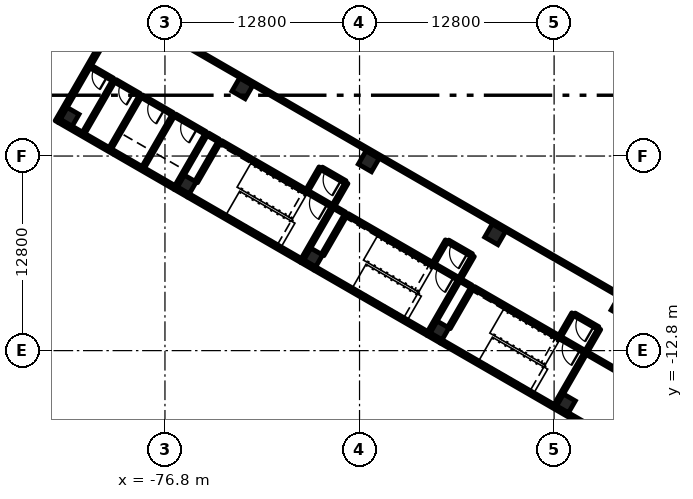
"""IFC4 building model, lengths in metres.
Left out: names, types, materials, properties, quantities, classifications, styles, units other than length and angle.
Written with IfcOpenShell. Run it as: python <this file> out.ifc"""

import sys

from ifc_helpers import new_model, si_unit, direction, frame, frame_2d, origin, origin_2d, place, context, subcontext, project, spatial, rectangle, extrude, element, fill, save


model = new_model("IFC4")
c1 = context("Model", 3, precision=1e-05, world=origin(), true_north=direction((0.0, 1.0)))
c2 = subcontext(c1, "Body", "Model", "MODEL_VIEW")
j1 = project(units=[si_unit("LENGTHUNIT", "METRE"), si_unit("PLANEANGLEUNIT", "RADIAN")], contexts=[c1])
p1 = place(None, origin())
s1 = spatial("IfcSite", under=j1, at=p1, CompositionType="ELEMENT")
p2 = place(p1, origin())
s2 = spatial("IfcBuilding", under=s1, at=p2, CompositionType="ELEMENT")
p3 = place(p2, frame((0.0, 0.0, 11.4)))
s3 = spatial("IfcBuildingStorey", under=s2, at=p3, CompositionType="ELEMENT", Elevation=11.4)
for number, where, z_axis, x_axis in (
    (1, (-46.768, -9.949, 0.0), (0.0, 0.0, 1.0), (-0.5, -0.866, 0.0)),
    (2, (-55.082, -5.149, 0.0), (0.0, 0.0, 1.0), (-0.5, -0.866, 0.0)),
    (3, (-63.396, -0.349, 0.0), (0.0, 0.0, 1.0), (-0.5, -0.866, 0.0)),
    (4, (-71.71, 4.451, 0.0), (0.0, 0.0, 1.0), (-0.5, -0.866, 0.0)),
):
    element("IfcColumn", number, at=place(p3, frame(where, z_axis=z_axis, x_axis=x_axis)), inside=s3, PredefinedType="COLUMN", context=c2, shape_type="SweptSolid", body=[
        extrude(rectangle(XDim=1.0, YDim=1.0, at=origin_2d()), origin(), (0.0, 0.0, 1.0), 4.8),
    ])
for number, where, z_axis, x_axis in (
    (5, (-50.418, -16.271, 0.0), (0.0, 0.0, 1.0), (-0.5, -0.866, 0.0)),
    (6, (-58.732, -11.471, 0.0), (0.0, 0.0, 1.0), (-0.5, -0.866, 0.0)),
    (7, (-67.046, -6.671, 0.0), (0.0, 0.0, 1.0), (-0.5, -0.866, 0.0)),
    (8, (-75.36, -1.871, 0.0), (0.0, 0.0, 1.0), (-0.5, -0.866, 0.0)),
    (9, (-83.067, 2.579, 0.0), (0.0, 0.0, 1.0), (-0.5, -0.866, 0.0)),
):
    element("IfcColumn", number, at=place(p3, frame(where, z_axis=z_axis, x_axis=x_axis)), inside=s3, PredefinedType="COLUMN", context=c2, shape_type="SweptSolid", body=[
        extrude(rectangle(XDim=0.9, YDim=0.9, at=origin_2d()), origin(), (0.0, 0.0, 1.0), 4.8),
    ])
p4 = place(p3, frame((-83.915, 2.26, 0.0), z_axis=(0.0, 0.0, 1.0), x_axis=(0.500001855621, 0.866024332438, 0.0)))
e10 = element("IfcWall", 10, at=p4, inside=s3, PredefinedType="SOLIDWALL", context=c2, shape_type="SweptSolid", body=[
    extrude(rectangle(XDim=10.312, YDim=0.25, at=frame_2d((5.156, 0.0))), origin(), (0.0, 0.0, 1.0), 4.5),
])
p5 = place(p3, frame((-48.562, -18.006, 0.0), z_axis=(0.0, 0.0, 1.0), x_axis=(-0.866027159341, 0.499996959274, 0.0)))
e11 = element("IfcWall", 11, at=p5, inside=s3, PredefinedType="SOLIDWALL", context=c2, shape_type="SweptSolid", body=[
    extrude(rectangle(XDim=11.625, YDim=0.25, at=frame_2d((5.812, 0.0))), origin(), (0.0, 0.0, 1.0), 4.5),
])
p6 = place(p3, frame((-59.496, -11.694, 0.0), z_axis=(0.0, 0.0, 1.0), x_axis=(-0.866021068297, 0.500007509209, 0.0)))
e12 = element("IfcWall", 12, at=p6, inside=s3, PredefinedType="SOLIDWALL", context=c2, shape_type="SweptSolid", body=[
    extrude(rectangle(XDim=8.6, YDim=0.25, at=frame_2d((4.3, 0.0))), origin(), (0.0, 0.0, 1.0), 4.5),
])
p7 = place(p3, frame((-67.81, -6.894, 0.0), z_axis=(0.0, 0.0, 1.0), x_axis=(-0.866028165386, 0.499995216735, 0.0)))
e13 = element("IfcWall", 13, at=p7, inside=s3, PredefinedType="SOLIDWALL", context=c2, shape_type="SweptSolid", body=[
    extrude(rectangle(XDim=8.6, YDim=0.25, at=frame_2d((4.3, 0.0))), origin(), (0.0, 0.0, 1.0), 4.5),
])
p8 = place(p3, frame((-76.124, -2.094, 0.0), z_axis=(0.0, 0.0, 1.0), x_axis=(-0.866025267465, 0.500000236112, 0.0)))
e14 = element("IfcWall", 14, at=p8, inside=s3, PredefinedType="SOLIDWALL", context=c2, shape_type="SweptSolid", body=[
    extrude(rectangle(XDim=8.8, YDim=0.25, at=frame_2d((4.4, 0.0))), origin(), (0.0, 0.0, 1.0), 4.5),
])
for number, where, z_axis, x_axis in (
    (15, (-58.63, -12.194, 0.0), (0.0, 0.0, 1.0), (-0.866, 0.5, 0.0)),
    (16, (-66.944, -7.394, 0.0), (0.0, 0.0, 1.0), (-0.866, 0.5, 0.0)),
    (17, (-75.258, -2.594, 0.0), (0.0, 0.0, 1.0), (-0.866, 0.5, 0.0)),
):
    element("IfcWall", number, at=place(p3, frame(where, z_axis=z_axis, x_axis=x_axis)), inside=s3, PredefinedType="SOLIDWALL", context=c2, shape_type="SweptSolid", body=[
        extrude(rectangle(XDim=1.0, YDim=0.25, at=frame_2d((0.5, 0.0))), origin(), (0.0, 0.0, 1.0), 4.5),
    ])
p9 = place(p3, frame((-49.119, -12.921, 0.0), z_axis=(0.0, 0.0, 1.0), x_axis=(-0.49999894854, -0.866026010844, 0.0)))
e18 = element("IfcWall", 18, at=p9, inside=s3, PredefinedType="SOLIDWALL", context=c2, shape_type="SweptSolid", body=[
    extrude(rectangle(XDim=4.0, YDim=0.2, at=frame_2d((2.0, 0.0))), origin(), (0.0, 0.0, 1.0), 4.5),
])
p10 = place(p3, frame((-56.567, -8.621, 0.0), z_axis=(0.0, 0.0, 1.0), x_axis=(-0.499933790963, -0.866063626216, 0.0)))
e19 = element("IfcWall", 19, at=p10, inside=s3, PredefinedType="SOLIDWALL", context=c2, shape_type="SweptSolid", body=[
    extrude(rectangle(XDim=3.1, YDim=0.2, at=frame_2d((1.55, 0.0))), origin(), (0.0, 0.0, 1.0), 4.5),
])
p11 = place(p3, frame((-57.433, -8.121, 0.0), z_axis=(0.0, 0.0, 1.0), x_axis=(-0.49999894854, -0.866026010844, 0.0)))
e20 = element("IfcWall", 20, at=p11, inside=s3, PredefinedType="SOLIDWALL", context=c2, shape_type="SweptSolid", body=[
    extrude(rectangle(XDim=4.0, YDim=0.2, at=frame_2d((2.0, 0.0))), origin(), (0.0, 0.0, 1.0), 4.5),
])
p12 = place(p3, frame((-64.881, -3.821, 0.0), z_axis=(0.0, 0.0, 1.0), x_axis=(-0.49999285859, -0.86602952684, 0.0)))
e21 = element("IfcWall", 21, at=p12, inside=s3, PredefinedType="SOLIDWALL", context=c2, shape_type="SweptSolid", body=[
    extrude(rectangle(XDim=3.1, YDim=0.2, at=frame_2d((1.55, 0.0))), origin(), (0.0, 0.0, 1.0), 4.5),
])
p13 = place(p3, frame((-65.747, -3.321, 0.0), z_axis=(0.0, 0.0, 1.0), x_axis=(-0.49999894854, -0.866026010844, 0.0)))
e22 = element("IfcWall", 22, at=p13, inside=s3, PredefinedType="SOLIDWALL", context=c2, shape_type="SweptSolid", body=[
    extrude(rectangle(XDim=4.0, YDim=0.2, at=frame_2d((2.0, 0.0))), origin(), (0.0, 0.0, 1.0), 4.5),
])
p14 = place(p3, frame((-73.195, 0.979, 0.0), z_axis=(0.0, 0.0, 1.0), x_axis=(-0.500026960575, -0.86600983753, 0.0)))
e23 = element("IfcWall", 23, at=p14, inside=s3, PredefinedType="SOLIDWALL", context=c2, shape_type="SweptSolid", body=[
    extrude(rectangle(XDim=3.1, YDim=0.2, at=frame_2d((1.55, 0.0))), origin(), (0.0, 0.0, 1.0), 4.5),
])
p15 = place(p3, frame((-49.206, -12.871, 0.0), z_axis=(0.0, 0.0, 1.0), x_axis=(-0.866036909293, 0.499980071345, 0.0)))
e24 = element("IfcWall", 24, at=p15, inside=s3, PredefinedType="SOLIDWALL", context=c2, shape_type="SweptSolid", body=[
    extrude(rectangle(XDim=1.75, YDim=0.2, at=frame_2d((0.875, 0.0))), origin(), (0.0, 0.0, 1.0), 4.5),
])
p16 = place(p15, frame((0.3, 0.0, 0.0)))
e25 = element("IfcOpeningElement", 25, at=p16, cuts=e24, PredefinedType="OPENING", context=c2, shape_type="SweptSolid", body=[
    extrude(rectangle(XDim=1.2, YDim=2.1, at=frame_2d((0.6, 1.05))), frame((0.0, 0.11, 0.0), z_axis=(0.0, -1.0, 0.0), x_axis=(1.0, 0.0, 0.0)), (0.0, 0.0, 1.0), 0.22),
])
p17 = place(p3, frame((-50.722, -11.996, 0.0), z_axis=(0.0, 0.0, 1.0), x_axis=(-0.866027239912, 0.49999681972, 0.0)))
e26 = element("IfcWall", 26, at=p17, inside=s3, PredefinedType="SOLIDWALL", context=c2, shape_type="SweptSolid", body=[
    extrude(rectangle(XDim=6.65, YDim=0.2, at=frame_2d((3.325, 0.0))), origin(), (0.0, 0.0, 1.0), 4.5),
])
p18 = place(p3, frame((-57.52, -8.071, 0.0), z_axis=(0.0, 0.0, 1.0), x_axis=(-0.866002029911, 0.500040482552, 0.0)))
e27 = element("IfcWall", 27, at=p18, inside=s3, PredefinedType="SOLIDWALL", context=c2, shape_type="SweptSolid", body=[
    extrude(rectangle(XDim=1.75, YDim=0.2, at=frame_2d((0.875, 0.0))), origin(), (0.0, 0.0, 1.0), 4.5),
])
p19 = place(p18, frame((0.3, 0.0, 0.0)))
e28 = element("IfcOpeningElement", 28, at=p19, cuts=e27, PredefinedType="OPENING", context=c2, shape_type="SweptSolid", body=[
    extrude(rectangle(XDim=1.2, YDim=2.1, at=frame_2d((0.6, 1.05))), frame((0.0, 0.11, 0.0), z_axis=(0.0, -1.0, 0.0), x_axis=(1.0, 0.0, 0.0)), (0.0, 0.0, 1.0), 0.22),
])
p20 = place(p3, frame((-59.035, -7.196, 0.0), z_axis=(0.0, 0.0, 1.0), x_axis=(-0.866027239912, 0.49999681972, 0.0)))
e29 = element("IfcWall", 29, at=p20, inside=s3, PredefinedType="SOLIDWALL", context=c2, shape_type="SweptSolid", body=[
    extrude(rectangle(XDim=6.65, YDim=0.2, at=frame_2d((3.325, 0.0))), origin(), (0.0, 0.0, 1.0), 4.5),
])
p21 = place(p3, frame((-65.834, -3.271, 0.0), z_axis=(0.0, 0.0, 1.0), x_axis=(-0.866036909293, 0.499980071345, 0.0)))
e30 = element("IfcWall", 30, at=p21, inside=s3, PredefinedType="SOLIDWALL", context=c2, shape_type="SweptSolid", body=[
    extrude(rectangle(XDim=1.75, YDim=0.2, at=frame_2d((0.875, 0.0))), origin(), (0.0, 0.0, 1.0), 4.5),
])
p22 = place(p21, frame((0.3, 0.0, 0.0)))
e31 = element("IfcOpeningElement", 31, at=p22, cuts=e30, PredefinedType="OPENING", context=c2, shape_type="SweptSolid", body=[
    extrude(rectangle(XDim=1.2, YDim=2.1, at=frame_2d((0.6, 1.05))), frame((0.0, 0.11, 0.0), z_axis=(0.0, -1.0, 0.0), x_axis=(1.0, 0.0, 0.0)), (0.0, 0.0, 1.0), 0.22),
])
p23 = place(p3, frame((-67.349, -2.396, 0.0), z_axis=(0.0, 0.0, 1.0), x_axis=(-0.86601134256, 0.500024353964, 0.0)))
e32 = element("IfcWall", 32, at=p23, inside=s3, PredefinedType="SOLIDWALL", context=c2, shape_type="SweptSolid", body=[
    extrude(rectangle(XDim=6.65, YDim=0.2, at=frame_2d((3.325, 0.0))), origin(), (0.0, 0.0, 1.0), 4.5),
])
for number, where, z_axis, x_axis in (
    (33, (-74.061, 1.479, 0.0), (0.0, 0.0, 1.0), (-0.5, -0.866, 0.0)),
    (34, (-76.226, 2.729, 0.0), (0.0, 0.0, 1.0), (-0.5, -0.866, 0.0)),
    (35, (-78.391, 3.979, 0.0), (0.0, 0.0, 1.0), (-0.5, -0.866, 0.0)),
):
    element("IfcWall", number, at=place(p3, frame(where, z_axis=z_axis, x_axis=x_axis)), inside=s3, PredefinedType="SOLIDWALL", context=c2, shape_type="SweptSolid", body=[
        extrude(rectangle(XDim=4.0, YDim=0.2, at=frame_2d((2.0, 0.0))), origin(), (0.0, 0.0, 1.0), 4.5),
    ])
p24 = place(p3, frame((-74.148, 1.529, 0.0), z_axis=(0.0, 0.0, 1.0), x_axis=(-0.865980515519, 0.500077740698, 0.0)))
e36 = element("IfcWall", 36, at=p24, inside=s3, PredefinedType="SOLIDWALL", context=c2, shape_type="SweptSolid", body=[
    extrude(rectangle(XDim=2.3, YDim=0.2, at=frame_2d((1.15, 0.0))), origin(), (0.0, 0.0, 1.0), 4.5),
])
p25 = place(p24, frame((0.6, 0.0, 0.0)))
e37 = element("IfcOpeningElement", 37, at=p25, cuts=e36, PredefinedType="OPENING", context=c2, shape_type="SweptSolid", body=[
    extrude(rectangle(XDim=1.1, YDim=2.1, at=frame_2d((0.55, 1.05))), frame((0.0, 0.11, 0.0), z_axis=(0.0, -1.0, 0.0), x_axis=(1.0, 0.0, 0.0)), (0.0, 0.0, 1.0), 0.22),
])
p26 = place(p3, frame((-76.313, 2.779, 0.0), z_axis=(0.0, 0.0, 1.0), x_axis=(-0.865980515519, 0.500077740698, 0.0)))
e38 = element("IfcWall", 38, at=p26, inside=s3, PredefinedType="SOLIDWALL", context=c2, shape_type="SweptSolid", body=[
    extrude(rectangle(XDim=2.3, YDim=0.2, at=frame_2d((1.15, 0.0))), origin(), (0.0, 0.0, 1.0), 4.5),
])
p27 = place(p26, frame((0.6, 0.0, 0.0)))
e39 = element("IfcOpeningElement", 39, at=p27, cuts=e38, PredefinedType="OPENING", context=c2, shape_type="SweptSolid", body=[
    extrude(rectangle(XDim=1.1, YDim=2.1, at=frame_2d((0.55, 1.05))), frame((0.0, 0.11, 0.0), z_axis=(0.0, -1.0, 0.0), x_axis=(1.0, 0.0, 0.0)), (0.0, 0.0, 1.0), 0.22),
])
for number, where, z_axis, x_axis in (
    (40, (-48.219, -11.363, 0.0), (0.0, 0.0, 1.0), (-0.5, -0.866, 0.0)),
    (41, (-49.951, -10.363, 0.0), (0.0, 0.0, 1.0), (-0.5, -0.866, 0.0)),
):
    element("IfcWall", number, at=place(p3, frame(where, z_axis=z_axis, x_axis=x_axis)), inside=s3, PredefinedType="PARTITIONING", context=c2, shape_type="SweptSolid", body=[
        extrude(rectangle(XDim=1.7, YDim=0.2, at=frame_2d((0.85, 0.0))), origin(), (0.0, 0.0, 1.0), 3.9),
    ])
for number, where, z_axis, x_axis in (
    (42, (-56.533, -6.562, 0.0), (0.0, 0.0, 1.0), (-0.5, -0.866, 0.0)),
    (43, (-58.265, -5.562, 0.0), (0.0, 0.0, 1.0), (-0.5, -0.866, 0.0)),
):
    element("IfcWall", number, at=place(p3, frame(where, z_axis=z_axis, x_axis=x_axis)), inside=s3, PredefinedType="PARTITIONING", context=c2, shape_type="SweptSolid", body=[
        extrude(rectangle(XDim=1.7, YDim=0.2, at=frame_2d((0.85, 0.0))), origin(), (0.0, 0.0, 1.0), 3.9),
    ])
for number, where, z_axis, x_axis in (
    (44, (-64.847, -1.763, 0.0), (0.0, 0.0, 1.0), (-0.5, -0.866, 0.0)),
    (45, (-66.579, -0.763, 0.0), (0.0, 0.0, 1.0), (-0.5, -0.866, 0.0)),
):
    element("IfcWall", number, at=place(p3, frame(where, z_axis=z_axis, x_axis=x_axis)), inside=s3, PredefinedType="PARTITIONING", context=c2, shape_type="SweptSolid", body=[
        extrude(rectangle(XDim=1.7, YDim=0.2, at=frame_2d((0.85, 0.0))), origin(), (0.0, 0.0, 1.0), 3.9),
    ])
p28 = place(p3, frame((-48.306, -11.312, 0.0), z_axis=(0.0, 0.0, 1.0), x_axis=(-0.866047807691, 0.499961193289, 0.0)))
e46 = element("IfcWall", 46, at=p28, inside=s3, PredefinedType="PARTITIONING", context=c2, shape_type="SweptSolid", body=[
    extrude(rectangle(XDim=1.8, YDim=0.2, at=frame_2d((0.9, 0.0))), origin(), (0.0, 0.0, 1.0), 3.9),
])
p29 = place(p28, frame((0.3, 0.0, 0.0)))
e47 = element("IfcOpeningElement", 47, at=p29, cuts=e46, PredefinedType="OPENING", context=c2, shape_type="SweptSolid", body=[
    extrude(rectangle(XDim=1.2, YDim=2.1, at=frame_2d((0.6, 1.05))), frame((0.0, 0.11, 0.0), z_axis=(0.0, -1.0, 0.0), x_axis=(1.0, 0.0, 0.0)), (0.0, 0.0, 1.0), 0.22),
])
p30 = place(p3, frame((-56.62, -6.513, 0.0), z_axis=(0.0, 0.0, 1.0), x_axis=(-0.865989075817, 0.500062916607, 0.0)))
e48 = element("IfcWall", 48, at=p30, inside=s3, PredefinedType="PARTITIONING", context=c2, shape_type="SweptSolid", body=[
    extrude(rectangle(XDim=1.8, YDim=0.2, at=frame_2d((0.9, 0.0))), origin(), (0.0, 0.0, 1.0), 3.9),
])
p31 = place(p30, frame((0.3, 0.0, 0.0)))
e49 = element("IfcOpeningElement", 49, at=p31, cuts=e48, PredefinedType="OPENING", context=c2, shape_type="SweptSolid", body=[
    extrude(rectangle(XDim=1.2, YDim=2.1, at=frame_2d((0.6, 1.05))), frame((0.0, 0.11, 0.0), z_axis=(0.0, -1.0, 0.0), x_axis=(1.0, 0.0, 0.0)), (0.0, 0.0, 1.0), 0.22),
])
p32 = place(p3, frame((-64.934, -1.713, 0.0), z_axis=(0.0, 0.0, 1.0), x_axis=(-0.866022985545, 0.500004188491, 0.0)))
e50 = element("IfcWall", 50, at=p32, inside=s3, PredefinedType="PARTITIONING", context=c2, shape_type="SweptSolid", body=[
    extrude(rectangle(XDim=1.8, YDim=0.2, at=frame_2d((0.9, 0.0))), origin(), (0.0, 0.0, 1.0), 3.9),
])
p33 = place(p32, frame((0.3, 0.0, 0.0)))
e51 = element("IfcOpeningElement", 51, at=p33, cuts=e50, PredefinedType="OPENING", context=c2, shape_type="SweptSolid", body=[
    extrude(rectangle(XDim=1.2, YDim=2.1, at=frame_2d((0.6, 1.05))), frame((0.0, 0.11, 0.0), z_axis=(0.0, -1.0, 0.0), x_axis=(1.0, 0.0, 0.0)), (0.0, 0.0, 1.0), 0.22),
])
p34 = place(p3, frame((-80.145, 4.991, 0.0), z_axis=(0.0, 0.0, 1.0), x_axis=(-0.49999894854, -0.866026010844, 0.0)))
e52 = element("IfcWall", 52, at=p34, inside=s3, PredefinedType="PARTITIONING", context=c2, shape_type="SweptSolid", body=[
    extrude(rectangle(XDim=4.0, YDim=0.2, at=frame_2d((2.0, 0.0))), origin(), (0.0, 0.0, 1.0), 3.9),
])
p35 = place(p3, frame((-78.478, 4.029, 0.0), z_axis=(0.0, 0.0, 1.0), x_axis=(-0.865978377894, 0.500081442387, 0.0)))
e53 = element("IfcWall", 53, at=p35, inside=s3, PredefinedType="PARTITIONING", context=c2, shape_type="SweptSolid", body=[
    extrude(rectangle(XDim=1.825, YDim=0.2, at=frame_2d((0.913, 0.0))), origin(), (0.0, 0.0, 1.0), 3.9),
])
p36 = place(p35, frame((0.413, 0.0, 0.0)))
e54 = element("IfcOpeningElement", 54, at=p36, cuts=e53, PredefinedType="OPENING", context=c2, shape_type="SweptSolid", body=[
    extrude(rectangle(XDim=1.0, YDim=2.1, at=frame_2d((0.5, 1.05))), frame((0.0, 0.11, 0.0), z_axis=(0.0, -1.0, 0.0), x_axis=(1.0, 0.0, 0.0)), (0.0, 0.0, 1.0), 0.22),
])
p37 = place(p3, frame((-80.231, 5.041, 0.0), z_axis=(0.0, 0.0, 1.0), x_axis=(-0.865964676353, 0.500105168249, 0.0)))
e55 = element("IfcWall", 55, at=p37, inside=s3, PredefinedType="PARTITIONING", context=c2, shape_type="SweptSolid", body=[
    extrude(rectangle(XDim=1.675, YDim=0.2, at=frame_2d((0.837, 0.0))), origin(), (0.0, 0.0, 1.0), 3.9),
])
p38 = place(p37, frame((0.413, 0.0, 0.0)))
e56 = element("IfcOpeningElement", 56, at=p38, cuts=e55, PredefinedType="OPENING", context=c2, shape_type="SweptSolid", body=[
    extrude(rectangle(XDim=1.0, YDim=2.1, at=frame_2d((0.5, 1.05))), frame((0.0, 0.11, 0.0), z_axis=(0.0, -1.0, 0.0), x_axis=(1.0, 0.0, 0.0)), (0.0, 0.0, 1.0), 0.22),
])
p39 = place(p3, frame((-46.5, -14.434, 0.0), z_axis=(0.0, 0.0, 1.0), x_axis=(-0.866046596414, 0.499963291492, 0.0)))
e57 = element("IfcWall", 57, at=p39, inside=s3, PredefinedType="PARTITIONING", context=c2, shape_type="SweptSolid", body=[
    extrude(rectangle(XDim=2.925, YDim=0.2, at=frame_2d((1.462, 0.0))), origin(), (0.0, 0.0, 1.0), 3.9),
])
p40 = place(p3, frame((-41.866, -12.058, 0.0), z_axis=(0.0, 0.0, 1.0), x_axis=(-0.866025540551, 0.499999763114, 0.0)))
e58 = element("IfcWall", 58, at=p40, inside=s3, PredefinedType="PARTITIONING", context=c2, shape_type="SweptSolid", body=[
    extrude(rectangle(XDim=39.4, YDim=0.2, at=frame_2d((19.7, 0.0))), origin(), (0.0, 0.0, 1.0), 3.9),
])
p41 = place(p3, frame((-56.654, -8.571, 0.0), z_axis=(0.0, 0.0, 1.0), x_axis=(-0.866094119867, 0.499880961361, 0.0)))
e59 = element("IfcWall", 59, at=p41, inside=s3, PredefinedType="PARTITIONING", context=c2, shape_type="SweptSolid", body=[
    extrude(rectangle(XDim=0.8, YDim=0.2, at=frame_2d((0.4, 0.0))), origin(), (0.0, 0.0, 1.0), 3.9),
])
p42 = place(p3, frame((-64.968, -3.771, 0.0), z_axis=(0.0, 0.0, 1.0), x_axis=(-0.865885638426, 0.500242002602, 0.0)))
e60 = element("IfcWall", 60, at=p42, inside=s3, PredefinedType="PARTITIONING", context=c2, shape_type="SweptSolid", body=[
    extrude(rectangle(XDim=0.8, YDim=0.2, at=frame_2d((0.4, 0.0))), origin(), (0.0, 0.0, 1.0), 3.9),
])
p43 = place(p3, frame((-73.281, 1.029, 0.0), z_axis=(0.0, 0.0, 1.0), x_axis=(-0.865961984968, 0.500109828528, 0.0)))
e61 = element("IfcWall", 61, at=p43, inside=s3, PredefinedType="PARTITIONING", context=c2, shape_type="SweptSolid", body=[
    extrude(rectangle(XDim=0.8, YDim=0.2, at=frame_2d((0.4, 0.0))), origin(), (0.0, 0.0, 1.0), 3.9),
])
p44 = place(p16, origin())
e62 = element("IfcDoor", 62, at=p44, inside=s3, OperationType="SINGLE_SWING_LEFT", PredefinedType="DOOR", context=c2, shape_type="SweptSolid", body=[
    extrude(rectangle(XDim=1.2, YDim=2.1, at=frame_2d((0.6, 1.05))), frame((0.0, 0.025, 0.0), z_axis=(0.0, -1.0, 0.0), x_axis=(1.0, 0.0, 0.0)), (0.0, 0.0, 1.0), 0.05),
])
fill(e25, e62)
p45 = place(p19, origin())
e63 = element("IfcDoor", 63, at=p45, inside=s3, OperationType="SINGLE_SWING_LEFT", PredefinedType="DOOR", context=c2, shape_type="SweptSolid", body=[
    extrude(rectangle(XDim=1.2, YDim=2.1, at=frame_2d((0.6, 1.05))), frame((0.0, 0.025, 0.0), z_axis=(0.0, -1.0, 0.0), x_axis=(1.0, 0.0, 0.0)), (0.0, 0.0, 1.0), 0.05),
])
fill(e28, e63)
p46 = place(p22, origin())
e64 = element("IfcDoor", 64, at=p46, inside=s3, OperationType="SINGLE_SWING_LEFT", PredefinedType="DOOR", context=c2, shape_type="SweptSolid", body=[
    extrude(rectangle(XDim=1.2, YDim=2.1, at=frame_2d((0.6, 1.05))), frame((0.0, 0.025, 0.0), z_axis=(0.0, -1.0, 0.0), x_axis=(1.0, 0.0, 0.0)), (0.0, 0.0, 1.0), 0.05),
])
fill(e31, e64)
p47 = place(p25, origin())
e65 = element("IfcDoor", 65, at=p47, inside=s3, OperationType="DOUBLE_DOOR_SLIDING", PredefinedType="DOOR", context=c2, shape_type="SweptSolid", body=[
    extrude(rectangle(XDim=1.1, YDim=2.1, at=frame_2d((0.55, 1.05))), frame((0.0, 0.025, 0.0), z_axis=(0.0, -1.0, 0.0), x_axis=(1.0, 0.0, 0.0)), (0.0, 0.0, 1.0), 0.05),
])
fill(e37, e65)
p48 = place(p27, origin())
e66 = element("IfcDoor", 66, at=p48, inside=s3, OperationType="DOUBLE_DOOR_SLIDING", PredefinedType="DOOR", context=c2, shape_type="SweptSolid", body=[
    extrude(rectangle(XDim=1.1, YDim=2.1, at=frame_2d((0.55, 1.05))), frame((0.0, 0.025, 0.0), z_axis=(0.0, -1.0, 0.0), x_axis=(1.0, 0.0, 0.0)), (0.0, 0.0, 1.0), 0.05),
])
fill(e39, e66)
p49 = place(p29, origin())
e67 = element("IfcDoor", 67, at=p49, inside=s3, OperationType="SINGLE_SWING_LEFT", PredefinedType="DOOR", context=c2, shape_type="SweptSolid", body=[
    extrude(rectangle(XDim=1.2, YDim=2.1, at=frame_2d((0.6, 1.05))), frame((0.0, 0.025, 0.0), z_axis=(0.0, -1.0, 0.0), x_axis=(1.0, 0.0, 0.0)), (0.0, 0.0, 1.0), 0.05),
])
fill(e47, e67)
p50 = place(p31, origin())
e68 = element("IfcDoor", 68, at=p50, inside=s3, OperationType="SINGLE_SWING_LEFT", PredefinedType="DOOR", context=c2, shape_type="SweptSolid", body=[
    extrude(rectangle(XDim=1.2, YDim=2.1, at=frame_2d((0.6, 1.05))), frame((0.0, 0.025, 0.0), z_axis=(0.0, -1.0, 0.0), x_axis=(1.0, 0.0, 0.0)), (0.0, 0.0, 1.0), 0.05),
])
fill(e49, e68)
p51 = place(p33, origin())
e69 = element("IfcDoor", 69, at=p51, inside=s3, OperationType="SINGLE_SWING_LEFT", PredefinedType="DOOR", context=c2, shape_type="SweptSolid", body=[
    extrude(rectangle(XDim=1.2, YDim=2.1, at=frame_2d((0.6, 1.05))), frame((0.0, 0.025, 0.0), z_axis=(0.0, -1.0, 0.0), x_axis=(1.0, 0.0, 0.0)), (0.0, 0.0, 1.0), 0.05),
])
fill(e51, e69)
p52 = place(p36, origin())
e70 = element("IfcDoor", 70, at=p52, inside=s3, OperationType="SINGLE_SWING_LEFT", PredefinedType="DOOR", context=c2, shape_type="SweptSolid", body=[
    extrude(rectangle(XDim=1.0, YDim=2.1, at=frame_2d((0.5, 1.05))), frame((0.0, 0.025, 0.0), z_axis=(0.0, -1.0, 0.0), x_axis=(1.0, 0.0, 0.0)), (0.0, 0.0, 1.0), 0.05),
])
fill(e54, e70)
p53 = place(p38, origin())
e71 = element("IfcDoor", 71, at=p53, inside=s3, OperationType="SINGLE_SWING_LEFT", PredefinedType="DOOR", context=c2, shape_type="SweptSolid", body=[
    extrude(rectangle(XDim=1.0, YDim=2.1, at=frame_2d((0.5, 1.05))), frame((0.0, 0.025, 0.0), z_axis=(0.0, -1.0, 0.0), x_axis=(1.0, 0.0, 0.0)), (0.0, 0.0, 1.0), 0.05),
])
fill(e56, e71)
save(model, sys.argv[1])
